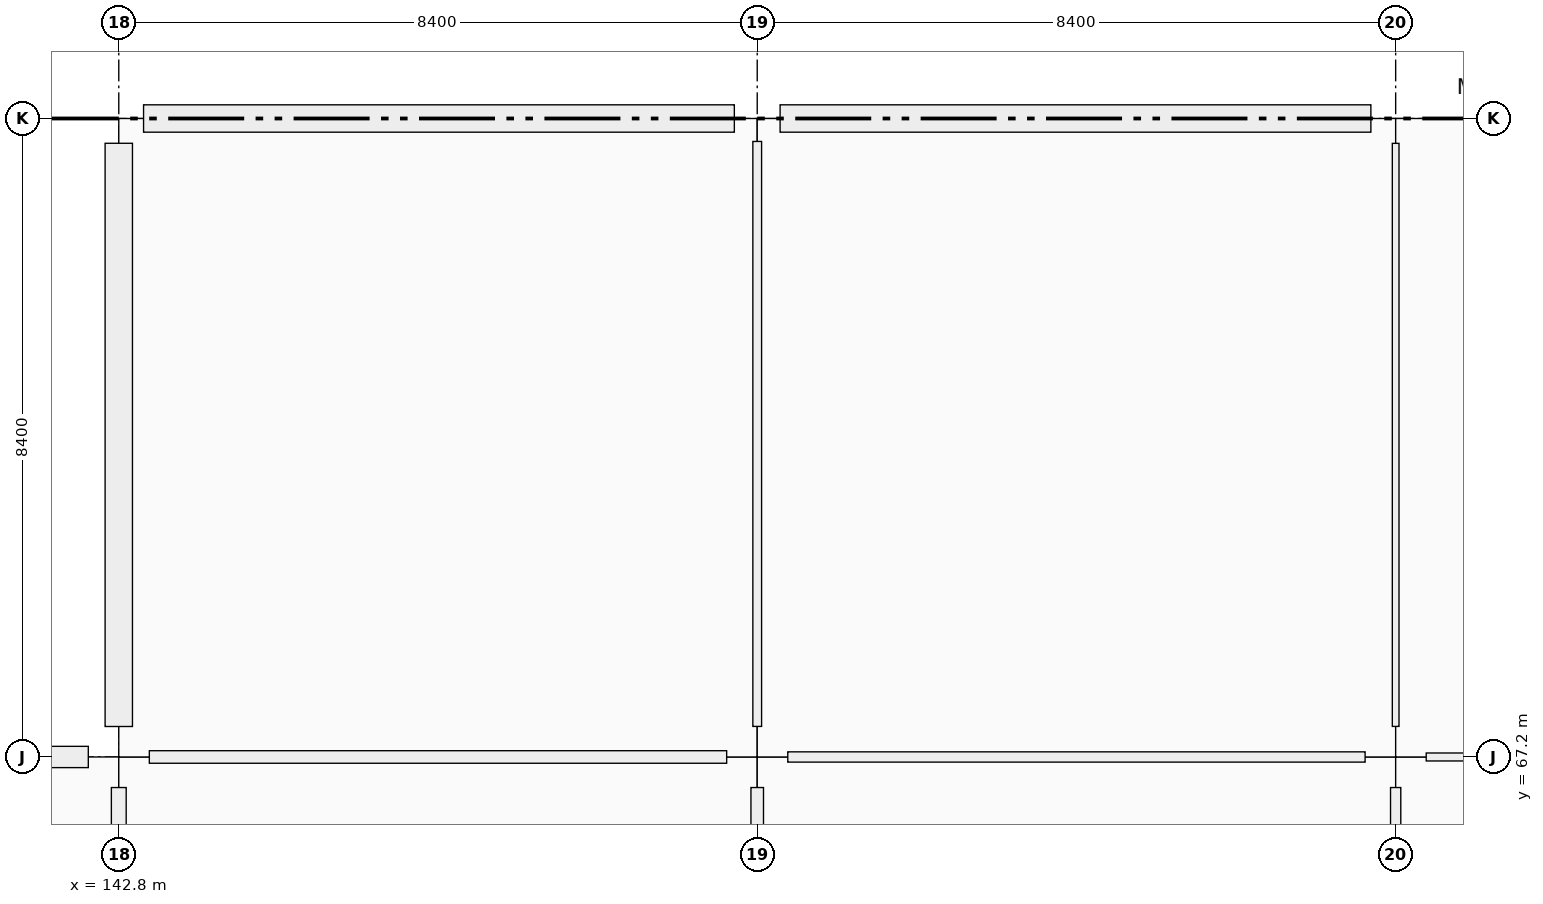
"""IFC4 building model, lengths in metres.
Left out: names, types, materials, properties, quantities, classifications, styles, units other than length and angle.
Written with IfcOpenShell. Run it as: python <this file> out.ifc"""

import sys

from ifc_helpers import new_model, si_unit, direction, frame, frame_2d, origin, origin_2d, place, context, subcontext, project, spatial, rectangle, extrude, element, fill, save


model = new_model("IFC4")
c1 = context("Model", 3, precision=1e-05, world=origin(), true_north=direction((0.0, 1.0)))
c2 = subcontext(c1, "Body", "Model", "MODEL_VIEW")
j1 = project(units=[si_unit("LENGTHUNIT", "METRE"), si_unit("PLANEANGLEUNIT", "RADIAN")], contexts=[c1])
p1 = place(None, origin())
s1 = spatial("IfcSite", under=j1, at=p1, CompositionType="ELEMENT")
p2 = place(p1, origin())
s2 = spatial("IfcBuilding", under=s1, at=p2, CompositionType="ELEMENT")
p3 = place(p2, origin())
s3 = spatial("IfcBuildingStorey", under=s2, at=p3, CompositionType="ELEMENT", Elevation=0.0)
p4 = place(p3, frame((142.8, 67.2, 0.0), z_axis=(0.0, 0.0, 1.0), x_axis=(1.0, 0.0, 0.0)))
e1 = element("IfcColumn", 1, at=p4, inside=s3, PredefinedType="COLUMN", context=c2, shape_type="SweptSolid", body=[
    extrude(rectangle(XDim=0.8, YDim=0.8, at=origin_2d()), origin(), (0.0, 0.0, 1.0), 5.76),
])
p5 = place(p3, frame((142.8, 75.6, 0.0), z_axis=(0.0, 0.0, 1.0), x_axis=(1.0, 0.0, 0.0)))
e2 = element("IfcColumn", 2, at=p5, inside=s3, PredefinedType="COLUMN", context=c2, shape_type="SweptSolid", body=[
    extrude(rectangle(XDim=0.65, YDim=0.65, at=origin_2d()), origin(), (0.0, 0.0, 1.0), 5.76),
])
p6 = place(p3, frame((151.2, 67.2, 0.0), z_axis=(0.0, 0.0, 1.0), x_axis=(1.0, 0.0, 0.0)))
e3 = element("IfcColumn", 3, at=p6, inside=s3, PredefinedType="COLUMN", context=c2, shape_type="SweptSolid", body=[
    extrude(rectangle(XDim=0.8, YDim=0.8, at=origin_2d()), origin(), (0.0, 0.0, 1.0), 5.76),
])
p7 = place(p3, frame((151.2, 75.6, 0.0), z_axis=(0.0, 0.0, 1.0), x_axis=(1.0, 0.0, 0.0)))
e4 = element("IfcColumn", 4, at=p7, inside=s3, PredefinedType="COLUMN", context=c2, shape_type="SweptSolid", body=[
    extrude(rectangle(XDim=0.6, YDim=0.6, at=origin_2d()), origin(), (0.0, 0.0, 1.0), 5.76),
])
p8 = place(p3, frame((159.6, 67.2, 0.0), z_axis=(0.0, 0.0, 1.0), x_axis=(1.0, 0.0, 0.0)))
e5 = element("IfcColumn", 5, at=p8, inside=s3, PredefinedType="COLUMN", context=c2, shape_type="SweptSolid", body=[
    extrude(rectangle(XDim=0.8, YDim=0.8, at=origin_2d()), origin(), (0.0, 0.0, 1.0), 5.76),
])
p9 = place(p3, frame((159.6, 75.6, 0.0), z_axis=(0.0, 0.0, 1.0), x_axis=(1.0, 0.0, 0.0)))
e6 = element("IfcColumn", 6, at=p9, inside=s3, PredefinedType="COLUMN", context=c2, shape_type="SweptSolid", body=[
    extrude(rectangle(XDim=0.65, YDim=0.65, at=origin_2d()), origin(), (0.0, 0.0, 1.0), 5.76),
])
p10 = place(p3, frame((134.776, 67.2, 0.0), z_axis=(0.0, 0.0, 1.0), x_axis=(1.0, 0.0, 0.0)))
e7 = element("IfcWall", 7, at=p10, inside=s3, PredefinedType="SOLIDWALL", context=c2, shape_type="SweptSolid", body=[
    extrude(rectangle(XDim=7.623, YDim=0.28, at=frame_2d((3.812, 0.0))), origin(), (0.0, 0.0, 1.0), 4.7),
])
p11 = place(p10, frame((2.537, 0.0, 0.9)))
e8 = element("IfcOpeningElement", 8, at=p11, cuts=e7, PredefinedType="OPENING", context=c2, shape_type="SweptSolid", body=[
    extrude(rectangle(XDim=2.55, YDim=1.95, at=frame_2d((1.275, 0.975))), frame((0.0, 0.14, 0.0), z_axis=(0.0, -1.0, 0.0), x_axis=(1.0, 0.0, 0.0)), (0.0, 0.0, 1.0), 0.28),
])
p12 = place(p3, frame((142.8, 67.601, 0.0), z_axis=(0.0, 0.0, 1.0), x_axis=(0.0, 1.0, 0.0)))
e9 = element("IfcWall", 9, at=p12, inside=s3, PredefinedType="SOLIDWALL", context=c2, shape_type="SweptSolid", body=[
    extrude(rectangle(XDim=7.673, YDim=0.36, at=frame_2d((3.836, 0.0))), origin(), (0.0, 0.0, 1.0), 4.7),
])
p13 = place(p12, frame((2.937, 0.0, 0.9)))
e10 = element("IfcOpeningElement", 10, at=p13, cuts=e9, PredefinedType="OPENING", context=c2, shape_type="SweptSolid", body=[
    extrude(rectangle(XDim=1.8, YDim=1.8, at=frame_2d((0.9, 0.9))), frame((0.0, 0.18, 0.0), z_axis=(0.0, -1.0, 0.0), x_axis=(1.0, 0.0, 0.0)), (0.0, 0.0, 1.0), 0.36),
])
p14 = place(p3, frame((143.126, 75.6, 0.0), z_axis=(0.0, 0.0, 1.0), x_axis=(1.0, 0.0, 0.0)))
e11 = element("IfcWall", 11, at=p14, inside=s3, PredefinedType="SOLIDWALL", context=c2, shape_type="SweptSolid", body=[
    extrude(rectangle(XDim=7.773, YDim=0.36, at=frame_2d((3.886, 0.0))), origin(), (0.0, 0.0, 1.0), 4.7),
])
p15 = place(p14, frame((2.837, 0.0, 0.9)))
e12 = element("IfcOpeningElement", 12, at=p15, cuts=e11, PredefinedType="OPENING", context=c2, shape_type="SweptSolid", body=[
    extrude(rectangle(XDim=2.1, YDim=1.8, at=frame_2d((1.05, 0.9))), frame((0.0, 0.18, 0.0), z_axis=(0.0, -1.0, 0.0), x_axis=(1.0, 0.0, 0.0)), (0.0, 0.0, 1.0), 0.36),
])
p16 = place(p3, frame((151.501, 75.6, 0.0), z_axis=(0.0, 0.0, 1.0), x_axis=(1.0, 0.0, 0.0)))
e13 = element("IfcWall", 13, at=p16, inside=s3, PredefinedType="SOLIDWALL", context=c2, shape_type="SweptSolid", body=[
    extrude(rectangle(XDim=7.773, YDim=0.36, at=frame_2d((3.886, 0.0))), origin(), (0.0, 0.0, 1.0), 4.7),
])
p17 = place(p16, frame((2.686, 0.0, 0.9)))
e14 = element("IfcOpeningElement", 14, at=p17, cuts=e13, PredefinedType="OPENING", context=c2, shape_type="SweptSolid", body=[
    extrude(rectangle(XDim=2.4, YDim=1.8, at=frame_2d((1.2, 0.9))), frame((0.0, 0.18, 0.0), z_axis=(0.0, -1.0, 0.0), x_axis=(1.0, 0.0, 0.0)), (0.0, 0.0, 1.0), 0.36),
])
p18 = place(p3, frame((143.202, 67.2, 0.0), z_axis=(0.0, 0.0, 1.0), x_axis=(1.0, 0.0, 0.0)))
e15 = element("IfcWall", 15, at=p18, inside=s3, PredefinedType="PARTITIONING", context=c2, shape_type="SweptSolid", body=[
    extrude(rectangle(XDim=7.596, YDim=0.165, at=frame_2d((3.798, 0.0))), origin(), (0.0, 0.0, 1.0), 3.66),
])
p19 = place(p18, frame((3.278, 0.0, 0.0)))
e16 = element("IfcOpeningElement", 16, at=p19, cuts=e15, PredefinedType="OPENING", context=c2, shape_type="SweptSolid", body=[
    extrude(rectangle(XDim=1.04, YDim=2.2, at=frame_2d((0.52, 1.1))), frame((0.0, 0.083, 0.0), z_axis=(0.0, -1.0, 0.0), x_axis=(1.0, 0.0, 0.0)), (0.0, 0.0, 1.0), 0.165),
])
p20 = place(p3, frame((151.602, 67.2, 0.0), z_axis=(0.0, 0.0, 1.0), x_axis=(1.0, 0.0, 0.0)))
e17 = element("IfcWall", 17, at=p20, inside=s3, PredefinedType="PARTITIONING", context=c2, shape_type="SweptSolid", body=[
    extrude(rectangle(XDim=7.596, YDim=0.135, at=frame_2d((3.798, 0.0))), origin(), (0.0, 0.0, 1.0), 3.66),
])
p21 = place(p20, frame((3.328, 0.0, 0.0)))
e18 = element("IfcOpeningElement", 18, at=p21, cuts=e17, PredefinedType="OPENING", context=c2, shape_type="SweptSolid", body=[
    extrude(rectangle(XDim=0.94, YDim=2.15, at=frame_2d((0.47, 1.075))), frame((0.0, 0.067, 0.0), z_axis=(0.0, -1.0, 0.0), x_axis=(1.0, 0.0, 0.0)), (0.0, 0.0, 1.0), 0.135),
])
p22 = place(p3, frame((160.002, 67.2, 0.0), z_axis=(0.0, 0.0, 1.0), x_axis=(1.0, 0.0, 0.0)))
e19 = element("IfcWall", 19, at=p22, inside=s3, PredefinedType="PARTITIONING", context=c2, shape_type="SweptSolid", body=[
    extrude(rectangle(XDim=7.596, YDim=0.105, at=frame_2d((3.798, 0.0))), origin(), (0.0, 0.0, 1.0), 3.66),
])
p23 = place(p22, frame((3.273, 0.0, 0.0)))
e20 = element("IfcOpeningElement", 20, at=p23, cuts=e19, PredefinedType="OPENING", context=c2, shape_type="SweptSolid", body=[
    extrude(rectangle(XDim=1.05, YDim=2.12, at=frame_2d((0.525, 1.06))), frame((0.0, 0.052, 0.0), z_axis=(0.0, -1.0, 0.0), x_axis=(1.0, 0.0, 0.0)), (0.0, 0.0, 1.0), 0.105),
])
p24 = place(p3, frame((142.8, 59.202, 0.0), z_axis=(0.0, 0.0, 1.0), x_axis=(0.0, 1.0, 0.0)))
e21 = element("IfcWall", 21, at=p24, inside=s3, PredefinedType="PARTITIONING", context=c2, shape_type="SweptSolid", body=[
    extrude(rectangle(XDim=7.596, YDim=0.195, at=frame_2d((3.798, 0.0))), origin(), (0.0, 0.0, 1.0), 3.66),
])
p25 = place(p24, frame((3.268, 0.0, 0.0)))
e22 = element("IfcOpeningElement", 22, at=p25, cuts=e21, PredefinedType="OPENING", context=c2, shape_type="SweptSolid", body=[
    extrude(rectangle(XDim=1.06, YDim=2.25, at=frame_2d((0.53, 1.125))), frame((0.0, 0.098, 0.0), z_axis=(0.0, -1.0, 0.0), x_axis=(1.0, 0.0, 0.0)), (0.0, 0.0, 1.0), 0.195),
])
p26 = place(p3, frame((151.2, 59.202, 0.0), z_axis=(0.0, 0.0, 1.0), x_axis=(0.0, 1.0, 0.0)))
e23 = element("IfcWall", 23, at=p26, inside=s3, PredefinedType="PARTITIONING", context=c2, shape_type="SweptSolid", body=[
    extrude(rectangle(XDim=7.596, YDim=0.165, at=frame_2d((3.798, 0.0))), origin(), (0.0, 0.0, 1.0), 3.66),
])
p27 = place(p26, frame((3.318, 0.0, 0.0)))
e24 = element("IfcOpeningElement", 24, at=p27, cuts=e23, PredefinedType="OPENING", context=c2, shape_type="SweptSolid", body=[
    extrude(rectangle(XDim=0.96, YDim=2.18, at=frame_2d((0.48, 1.09))), frame((0.0, 0.083, 0.0), z_axis=(0.0, -1.0, 0.0), x_axis=(1.0, 0.0, 0.0)), (0.0, 0.0, 1.0), 0.165),
])
p28 = place(p3, frame((151.2, 67.602, 0.0), z_axis=(0.0, 0.0, 1.0), x_axis=(0.0, 1.0, 0.0)))
e25 = element("IfcWall", 25, at=p28, inside=s3, PredefinedType="PARTITIONING", context=c2, shape_type="SweptSolid", body=[
    extrude(rectangle(XDim=7.696, YDim=0.115, at=frame_2d((3.848, 0.0))), origin(), (0.0, 0.0, 1.0), 3.66),
])
p29 = place(p28, frame((3.378, 0.0, 0.0)))
e26 = element("IfcOpeningElement", 26, at=p29, cuts=e25, PredefinedType="OPENING", context=c2, shape_type="SweptSolid", body=[
    extrude(rectangle(XDim=0.94, YDim=2.15, at=frame_2d((0.47, 1.075))), frame((0.0, 0.058, 0.0), z_axis=(0.0, -1.0, 0.0), x_axis=(1.0, 0.0, 0.0)), (0.0, 0.0, 1.0), 0.115),
])
p30 = place(p3, frame((159.6, 59.202, 0.0), z_axis=(0.0, 0.0, 1.0), x_axis=(0.0, 1.0, 0.0)))
e27 = element("IfcWall", 27, at=p30, inside=s3, PredefinedType="PARTITIONING", context=c2, shape_type="SweptSolid", body=[
    extrude(rectangle(XDim=7.596, YDim=0.135, at=frame_2d((3.798, 0.0))), origin(), (0.0, 0.0, 1.0), 3.66),
])
p31 = place(p30, frame((3.288, 0.0, 0.0)))
e28 = element("IfcOpeningElement", 28, at=p31, cuts=e27, PredefinedType="OPENING", context=c2, shape_type="SweptSolid", body=[
    extrude(rectangle(XDim=1.02, YDim=2.2, at=frame_2d((0.51, 1.1))), frame((0.0, 0.067, 0.0), z_axis=(0.0, -1.0, 0.0), x_axis=(1.0, 0.0, 0.0)), (0.0, 0.0, 1.0), 0.135),
])
p32 = place(p3, frame((159.6, 67.602, 0.0), z_axis=(0.0, 0.0, 1.0), x_axis=(0.0, 1.0, 0.0)))
e29 = element("IfcWall", 29, at=p32, inside=s3, PredefinedType="PARTITIONING", context=c2, shape_type="SweptSolid", body=[
    extrude(rectangle(XDim=7.671, YDim=0.088, at=frame_2d((3.835, 0.0))), origin(), (0.0, 0.0, 1.0), 3.66),
])
p33 = place(p32, frame((3.331, 0.0, 0.0)))
e30 = element("IfcOpeningElement", 30, at=p33, cuts=e29, PredefinedType="OPENING", context=c2, shape_type="SweptSolid", body=[
    extrude(rectangle(XDim=1.01, YDim=2.12, at=frame_2d((0.505, 1.06))), frame((0.0, 0.044, 0.0), z_axis=(0.0, -1.0, 0.0), x_axis=(1.0, 0.0, 0.0)), (0.0, 0.0, 1.0), 0.088),
])
p34 = place(p13, origin())
e31 = element("IfcWindow", 31, at=p34, inside=s3, PartitioningType="SINGLE_PANEL", PredefinedType="WINDOW", context=c2, shape_type="SweptSolid", body=[
    extrude(rectangle(XDim=1.8, YDim=1.8, at=frame_2d((0.9, 0.9))), frame((0.0, 0.03, 0.0), z_axis=(0.0, -1.0, 0.0), x_axis=(1.0, 0.0, 0.0)), (0.0, 0.0, 1.0), 0.06),
])
fill(e10, e31)
p35 = place(p15, origin())
e32 = element("IfcWindow", 32, at=p35, inside=s3, PartitioningType="SINGLE_PANEL", PredefinedType="WINDOW", context=c2, shape_type="SweptSolid", body=[
    extrude(rectangle(XDim=2.1, YDim=1.8, at=frame_2d((1.05, 0.9))), frame((0.0, 0.03, 0.0), z_axis=(0.0, -1.0, 0.0), x_axis=(1.0, 0.0, 0.0)), (0.0, 0.0, 1.0), 0.06),
])
fill(e12, e32)
p36 = place(p17, origin())
e33 = element("IfcWindow", 33, at=p36, inside=s3, PartitioningType="SINGLE_PANEL", PredefinedType="WINDOW", context=c2, shape_type="SweptSolid", body=[
    extrude(rectangle(XDim=2.4, YDim=1.8, at=frame_2d((1.2, 0.9))), frame((0.0, 0.03, 0.0), z_axis=(0.0, -1.0, 0.0), x_axis=(1.0, 0.0, 0.0)), (0.0, 0.0, 1.0), 0.06),
])
fill(e14, e33)
p37 = place(p19, origin())
e34 = element("IfcDoor", 34, at=p37, inside=s3, OperationType="SINGLE_SWING_LEFT", PredefinedType="DOOR", context=c2, shape_type="SweptSolid", body=[
    extrude(rectangle(XDim=1.04, YDim=2.2, at=frame_2d((0.52, 1.1))), frame((0.0, 0.025, 0.0), z_axis=(0.0, -1.0, 0.0), x_axis=(1.0, 0.0, 0.0)), (0.0, 0.0, 1.0), 0.05),
])
fill(e16, e34)
p38 = place(p21, origin())
e35 = element("IfcDoor", 35, at=p38, inside=s3, OperationType="SINGLE_SWING_RIGHT", PredefinedType="DOOR", context=c2, shape_type="SweptSolid", body=[
    extrude(rectangle(XDim=0.94, YDim=2.15, at=frame_2d((0.47, 1.075))), frame((0.0, 0.025, 0.0), z_axis=(0.0, -1.0, 0.0), x_axis=(1.0, 0.0, 0.0)), (0.0, 0.0, 1.0), 0.05),
])
fill(e18, e35)
p39 = place(p29, origin())
e36 = element("IfcDoor", 36, at=p39, inside=s3, OperationType="SINGLE_SWING_LEFT", PredefinedType="DOOR", context=c2, shape_type="SweptSolid", body=[
    extrude(rectangle(XDim=0.94, YDim=2.15, at=frame_2d((0.47, 1.075))), frame((0.0, 0.025, 0.0), z_axis=(0.0, -1.0, 0.0), x_axis=(1.0, 0.0, 0.0)), (0.0, 0.0, 1.0), 0.05),
])
fill(e26, e36)
p40 = place(p33, origin())
e37 = element("IfcDoor", 37, at=p40, inside=s3, OperationType="SINGLE_SWING_RIGHT", PredefinedType="DOOR", context=c2, shape_type="SweptSolid", body=[
    extrude(rectangle(XDim=1.01, YDim=2.12, at=frame_2d((0.505, 1.06))), frame((0.0, 0.025, 0.0), z_axis=(0.0, -1.0, 0.0), x_axis=(1.0, 0.0, 0.0)), (0.0, 0.0, 1.0), 0.05),
])
fill(e30, e37)
save(model, sys.argv[1])
